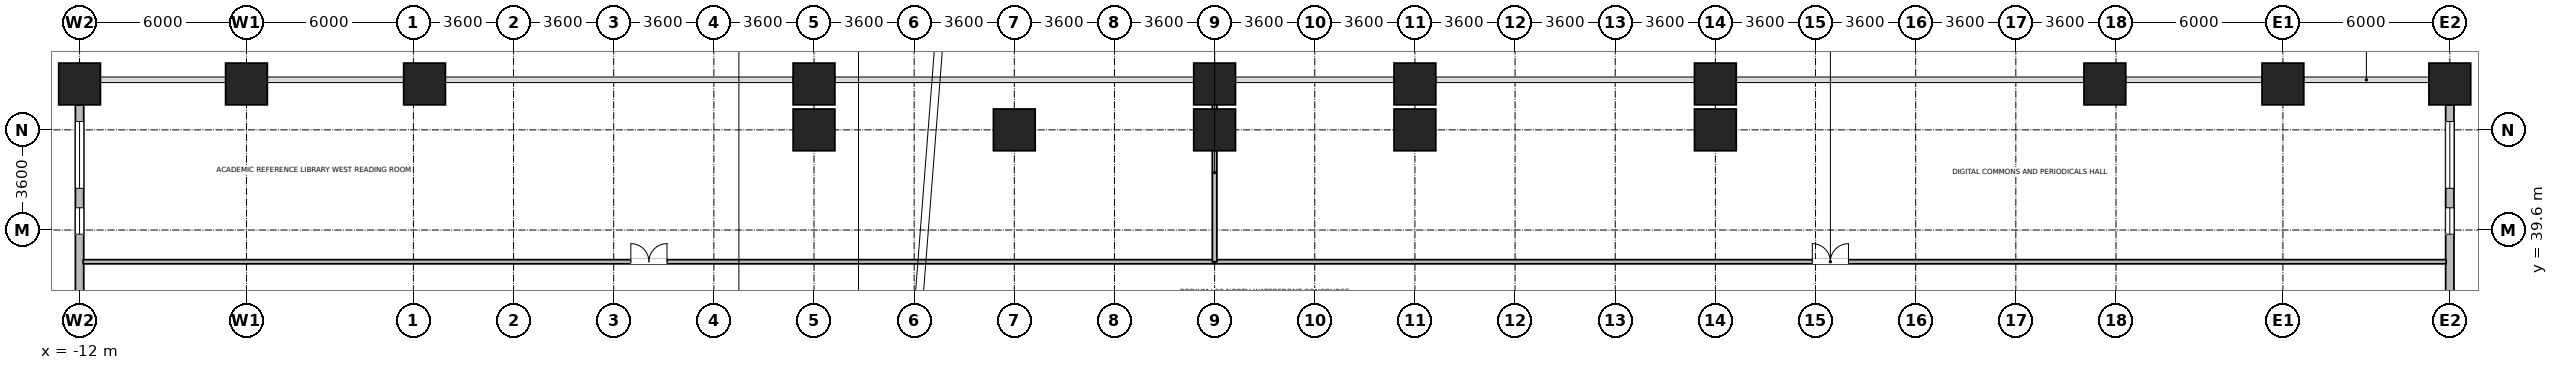
"""IFC4 building model, lengths in metres.
Left out: names, types, materials, properties, quantities, classifications, styles, units other than length and angle.
Written with IfcOpenShell. Run it as: python <this file> out.ifc"""

import sys

from ifc_helpers import new_model, si_unit, direction, frame, frame_2d, origin, origin_2d, place, context, subcontext, project, spatial, rectangle, extrude, source, transform, mapped, element, fill, save


model = new_model("IFC4")
c1 = context("Model", 3, precision=1e-05, world=origin(), true_north=direction((0.0, 1.0)))
c2 = subcontext(c1, "Body", "Model", "MODEL_VIEW")
j1 = project(units=[si_unit("LENGTHUNIT", "METRE"), si_unit("PLANEANGLEUNIT", "RADIAN")], contexts=[c1])
p1 = place(None, origin())
s1 = spatial("IfcSite", under=j1, at=p1, CompositionType="ELEMENT")
p2 = place(p1, origin())
s2 = spatial("IfcBuilding", under=s1, at=p2, CompositionType="ELEMENT")
p3 = place(p2, frame((0.0, 0.0, 10.2)))
s3 = spatial("IfcBuildingStorey", under=s2, at=p3, CompositionType="ELEMENT", Elevation=10.2)
m1 = source(origin(), c2, "Body", "SweptSolid", [
    extrude(rectangle(XDim=1.5, YDim=1.5, at=origin_2d()), origin(), (0.0, 0.0, 1.0), 4.8),
])
for number, where, z_axis, x_axis in (
    (1, (14.4, 43.2, 0.0), (0.0, 0.0, 1.0), (1.0, 0.0, 0.0)),
    (2, (21.6, 43.2, 0.0), (0.0, 0.0, 1.0), (1.0, 0.0, 0.0)),
    (3, (28.8, 43.2, 0.0), (0.0, 0.0, 1.0), (1.0, 0.0, 0.0)),
    (4, (36.0, 43.2, 0.0), (0.0, 0.0, 1.0), (1.0, 0.0, 0.0)),
    (5, (46.8, 43.2, 0.0), (0.0, 0.0, 1.0), (1.0, 0.0, 0.0)),
    (6, (0.4, 44.85, 0.0), (0.0, 0.0, 1.0), (1.0, 0.0, 0.0)),
    (7, (14.4, 44.85, 0.0), (0.0, 0.0, 1.0), (1.0, 0.0, 0.0)),
    (8, (28.8, 44.85, 0.0), (0.0, 0.0, 1.0), (1.0, 0.0, 0.0)),
    (9, (36.0, 44.85, 0.0), (0.0, 0.0, 1.0), (1.0, 0.0, 0.0)),
    (10, (46.8, 44.85, 0.0), (0.0, 0.0, 1.0), (1.0, 0.0, 0.0)),
    (11, (60.8, 44.85, 0.0), (0.0, 0.0, 1.0), (1.0, 0.0, 0.0)),
    (12, (-12.0, 44.85, 0.0), (0.0, 0.0, 1.0), (1.0, 0.0, 0.0)),
    (13, (-6.0, 44.85, 0.0), (0.0, 0.0, 1.0), (1.0, 0.0, 0.0)),
    (14, (67.2, 44.85, 0.0), (0.0, 0.0, 1.0), (1.0, 0.0, 0.0)),
    (15, (73.2, 44.85, 0.0), (0.0, 0.0, 1.0), (1.0, 0.0, 0.0)),
):
    element("IfcColumn", number, at=place(p3, frame(where, z_axis=z_axis, x_axis=x_axis)), inside=s3, PredefinedType="COLUMN", context=c2, shape_type="MappedRepresentation", body=[
        mapped(m1, transform((0.0, 0.0, 0.0), x_axis=(1.0, 0.0, 0.0), y_axis=(0.0, 1.0, 0.0), z_axis=(0.0, 0.0, 1.0), scale=1.0)),
    ])
p4 = place(p3, frame((73.2, 44.099, 0.0), z_axis=(0.0, 0.0, 1.0), x_axis=(0.0, -1.0, 0.0)))
e16 = element("IfcWall", 16, at=p4, inside=s3, PredefinedType="STANDARD", context=c2, shape_type="SweptSolid", body=[
    extrude(rectangle(XDim=7.198, YDim=0.3, at=frame_2d((3.599, 0.0))), origin(), (0.0, 0.0, 1.0), 3.9),
])
p5 = place(p4, frame((0.6, 0.0, 0.9)))
e17 = element("IfcOpeningElement", 17, at=p5, cuts=e16, PredefinedType="OPENING", context=c2, shape_type="SweptSolid", body=[
    extrude(rectangle(XDim=2.4, YDim=2.5, at=frame_2d((1.2, 1.25))), frame((0.0, 0.16, 0.0), z_axis=(0.0, -1.0, 0.0), x_axis=(1.0, 0.0, 0.0)), (0.0, 0.0, 1.0), 0.32),
])
p6 = place(p4, frame((3.7, 0.0, 0.9)))
e18 = element("IfcOpeningElement", 18, at=p6, cuts=e16, PredefinedType="OPENING", context=c2, shape_type="SweptSolid", body=[
    extrude(rectangle(XDim=0.95, YDim=1.75, at=frame_2d((0.475, 0.875))), frame((0.0, 0.16, 0.0), z_axis=(0.0, -1.0, 0.0), x_axis=(1.0, 0.0, 0.0)), (0.0, 0.0, 1.0), 0.32),
])
p7 = place(p3, frame((-12.0, 36.901, 0.0), z_axis=(0.0, 0.0, 1.0), x_axis=(0.0, 1.0, 0.0)))
e19 = element("IfcWall", 19, at=p7, inside=s3, PredefinedType="STANDARD", context=c2, shape_type="SweptSolid", body=[
    extrude(rectangle(XDim=7.198, YDim=0.3, at=frame_2d((3.599, 0.0))), origin(), (0.0, 0.0, 1.0), 3.9),
])
p8 = place(p7, frame((4.198, 0.0, 0.9)))
e20 = element("IfcOpeningElement", 20, at=p8, cuts=e19, PredefinedType="OPENING", context=c2, shape_type="SweptSolid", body=[
    extrude(rectangle(XDim=2.4, YDim=2.5, at=frame_2d((1.2, 1.25))), frame((0.0, 0.16, 0.0), z_axis=(0.0, -1.0, 0.0), x_axis=(1.0, 0.0, 0.0)), (0.0, 0.0, 1.0), 0.32),
])
p9 = place(p7, frame((2.548, 0.0, 0.9)))
e21 = element("IfcOpeningElement", 21, at=p9, cuts=e19, PredefinedType="OPENING", context=c2, shape_type="SweptSolid", body=[
    extrude(rectangle(XDim=0.95, YDim=1.75, at=frame_2d((0.475, 0.875))), frame((0.0, 0.16, 0.0), z_axis=(0.0, -1.0, 0.0), x_axis=(1.0, 0.0, 0.0)), (0.0, 0.0, 1.0), 0.32),
])
p10 = place(p3, frame((28.8, 38.46, 0.0), z_axis=(0.0, 0.0, 1.0), x_axis=(1.0, 0.0, 0.0)))
e22 = element("IfcWall", 22, at=p10, inside=s3, PredefinedType="PARTITIONING", context=c2, shape_type="SweptSolid", body=[
    extrude(rectangle(XDim=44.268, YDim=0.15, at=frame_2d((22.134, 0.0))), origin(), (0.0, 0.0, 1.0), 4.5),
])
p11 = place(p10, frame((21.484, 0.0, 0.0)))
e23 = element("IfcOpeningElement", 23, at=p11, cuts=e22, PredefinedType="OPENING", context=c2, shape_type="SweptSolid", body=[
    extrude(rectangle(XDim=1.3, YDim=2.12, at=frame_2d((0.65, 1.06))), frame((0.0, 0.085, 0.0), z_axis=(0.0, -1.0, 0.0), x_axis=(1.0, 0.0, 0.0)), (0.0, 0.0, 1.0), 0.17),
])
p12 = place(p3, frame((-11.868, 38.46, 0.0), z_axis=(0.0, 0.0, 1.0), x_axis=(1.0, 0.0, 0.0)))
e24 = element("IfcWall", 24, at=p12, inside=s3, PredefinedType="PARTITIONING", context=c2, shape_type="SweptSolid", body=[
    extrude(rectangle(XDim=40.668, YDim=0.15, at=frame_2d((20.334, 0.0))), origin(), (0.0, 0.0, 1.0), 4.5),
])
p13 = place(p12, frame((19.684, 0.0, 0.0)))
e25 = element("IfcOpeningElement", 25, at=p13, cuts=e24, PredefinedType="OPENING", context=c2, shape_type="SweptSolid", body=[
    extrude(rectangle(XDim=1.3, YDim=2.12, at=frame_2d((0.65, 1.06))), frame((0.0, 0.085, 0.0), z_axis=(0.0, -1.0, 0.0), x_axis=(1.0, 0.0, 0.0)), (0.0, 0.0, 1.0), 0.17),
])
p14 = place(p3, frame((28.8, 38.46, 0.0), z_axis=(0.0, 0.0, 1.0), x_axis=(0.0, 1.0, 0.0)))
e26 = element("IfcWall", 26, at=p14, inside=s3, PredefinedType="PARTITIONING", context=c2, shape_type="SweptSolid", body=[
    extrude(rectangle(XDim=6.408, YDim=0.165, at=frame_2d((3.204, 0.0))), origin(), (0.0, 0.0, 1.0), 3.9),
])
p15 = place(p5, origin())
e27 = element("IfcWindow", 27, at=p15, inside=s3, PartitioningType="SINGLE_PANEL", PredefinedType="WINDOW", context=c2, shape_type="SweptSolid", body=[
    extrude(rectangle(XDim=2.4, YDim=2.5, at=frame_2d((1.2, 1.25))), frame((0.0, 0.03, 0.0), z_axis=(0.0, -1.0, 0.0), x_axis=(1.0, 0.0, 0.0)), (0.0, 0.0, 1.0), 0.06),
])
fill(e17, e27)
p16 = place(p6, origin())
e28 = element("IfcWindow", 28, at=p16, inside=s3, PartitioningType="SINGLE_PANEL", PredefinedType="WINDOW", context=c2, shape_type="SweptSolid", body=[
    extrude(rectangle(XDim=0.95, YDim=1.75, at=frame_2d((0.475, 0.875))), frame((0.0, 0.03, 0.0), z_axis=(0.0, -1.0, 0.0), x_axis=(1.0, 0.0, 0.0)), (0.0, 0.0, 1.0), 0.06),
])
fill(e18, e28)
p17 = place(p8, origin())
e29 = element("IfcWindow", 29, at=p17, inside=s3, PartitioningType="SINGLE_PANEL", PredefinedType="WINDOW", context=c2, shape_type="SweptSolid", body=[
    extrude(rectangle(XDim=2.4, YDim=2.5, at=frame_2d((1.2, 1.25))), frame((0.0, 0.03, 0.0), z_axis=(0.0, -1.0, 0.0), x_axis=(1.0, 0.0, 0.0)), (0.0, 0.0, 1.0), 0.06),
])
fill(e20, e29)
p18 = place(p9, origin())
e30 = element("IfcWindow", 30, at=p18, inside=s3, PartitioningType="SINGLE_PANEL", PredefinedType="WINDOW", context=c2, shape_type="SweptSolid", body=[
    extrude(rectangle(XDim=0.95, YDim=1.75, at=frame_2d((0.475, 0.875))), frame((0.0, 0.03, 0.0), z_axis=(0.0, -1.0, 0.0), x_axis=(1.0, 0.0, 0.0)), (0.0, 0.0, 1.0), 0.06),
])
fill(e21, e30)
p19 = place(p11, origin())
e31 = element("IfcDoor", 31, at=p19, inside=s3, OperationType="DOUBLE_DOOR_SINGLE_SWING", PredefinedType="DOOR", context=c2, shape_type="SweptSolid", body=[
    extrude(rectangle(XDim=1.3, YDim=2.12, at=frame_2d((0.65, 1.06))), frame((0.0, 0.025, 0.0), z_axis=(0.0, -1.0, 0.0), x_axis=(1.0, 0.0, 0.0)), (0.0, 0.0, 1.0), 0.05),
])
fill(e23, e31)
p20 = place(p13, origin())
e32 = element("IfcDoor", 32, at=p20, inside=s3, OperationType="DOUBLE_DOOR_SINGLE_SWING", PredefinedType="DOOR", context=c2, shape_type="SweptSolid", body=[
    extrude(rectangle(XDim=1.3, YDim=2.12, at=frame_2d((0.65, 1.06))), frame((0.0, 0.025, 0.0), z_axis=(0.0, -1.0, 0.0), x_axis=(1.0, 0.0, 0.0)), (0.0, 0.0, 1.0), 0.05),
])
fill(e25, e32)
save(model, sys.argv[1])
